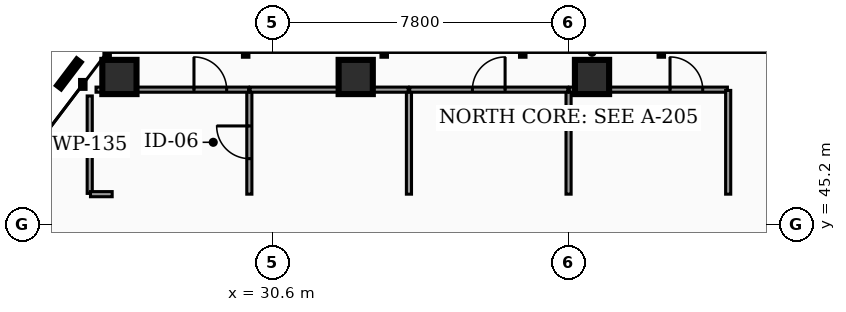
"""IFC4 building model, lengths in metres.
Left out: names, types, materials, properties, quantities, classifications, styles, units other than length and angle.
Written with IfcOpenShell. Run it as: python <this file> out.ifc"""

import sys

from ifc_helpers import new_model, si_unit, direction, frame, frame_2d, origin, origin_2d, place, context, subcontext, project, spatial, rectangle, hollow_rectangle, extrude, element, fill, save


model = new_model("IFC4")
c1 = context("Model", 3, precision=1e-05, world=origin(), true_north=direction((0.0, 1.0)))
c2 = subcontext(c1, "Body", "Model", "MODEL_VIEW")
j1 = project(units=[si_unit("LENGTHUNIT", "METRE"), si_unit("PLANEANGLEUNIT", "RADIAN")], contexts=[c1])
p1 = place(None, origin())
s1 = spatial("IfcSite", under=j1, at=p1, CompositionType="ELEMENT")
p2 = place(p1, origin())
s2 = spatial("IfcBuilding", under=s1, at=p2, CompositionType="ELEMENT")
p3 = place(p2, frame((0.0, 0.0, 80.58)))
s3 = spatial("IfcBuildingStorey", under=s2, at=p3, CompositionType="ELEMENT", Elevation=80.58)
p4 = place(p3, frame((39.017, 49.083, 0.0), z_axis=(-0.004982922693, -0.030472488775, 0.999523185279), x_axis=(0.986892561917, -0.161378657924, 0.0)))
e1 = element("IfcColumn", 1, at=p4, inside=s3, PredefinedType="COLUMN", context=c2, shape_type="SweptSolid", body=[
    extrude(hollow_rectangle(XDim=0.9, YDim=0.9, WallThickness=0.045, at=origin_2d()), origin(), (0.0, 0.0, 1.0), 3.822),
])
p5 = place(p3, frame((32.799, 49.083, 0.0), z_axis=(-0.074790251683, -0.03038752134, 0.996736182146), x_axis=(0.376419380936, -0.926449377816, 0.0)))
e2 = element("IfcColumn", 2, at=p5, inside=s3, PredefinedType="COLUMN", context=c2, shape_type="SweptSolid", body=[
    extrude(hollow_rectangle(XDim=0.9, YDim=0.9, WallThickness=0.045, at=origin_2d()), origin(), (0.0, 0.0, 1.0), 3.832),
])
p6 = place(p3, frame((26.581, 49.083, 0.0), z_axis=(-0.143392551065, -0.030157957168, 0.989206284816), x_axis=(0.205814766977, -0.978590967511, 0.0)))
e3 = element("IfcColumn", 3, at=p6, inside=s3, PredefinedType="COLUMN", context=c2, shape_type="SweptSolid", body=[
    extrude(hollow_rectangle(XDim=0.9, YDim=0.9, WallThickness=0.045, at=origin_2d()), origin(), (0.0, 0.0, 1.0), 3.862),
])
p7 = place(p3, frame((30.0, 46.0, 0.0), z_axis=(0.0, 0.0, 1.0), x_axis=(0.0, 1.0, 0.0)))
e4 = element("IfcWall", 4, at=p7, inside=s3, PredefinedType="PARTITIONING", context=c2, shape_type="SweptSolid", body=[
    extrude(rectangle(XDim=2.73, YDim=0.135, at=frame_2d((1.365, 0.0))), origin(), (0.0, 0.0, 1.0), 2.777),
])
p8 = place(p7, frame((0.935, 0.0, 0.0)))
e5 = element("IfcOpeningElement", 5, at=p8, cuts=e4, PredefinedType="OPENING", context=c2, shape_type="SweptSolid", body=[
    extrude(rectangle(XDim=0.86, YDim=2.05, at=frame_2d((0.43, 1.025))), frame((0.0, 0.077, 0.0), z_axis=(0.0, -1.0, 0.0), x_axis=(1.0, 0.0, 0.0)), (0.0, 0.0, 1.0), 0.155),
])
p9 = place(p3, frame((25.8, 46.02, 0.0), z_axis=(0.0, 0.0, 1.0), x_axis=(0.0, 1.0, 0.0)))
e6 = element("IfcWall", 6, at=p9, inside=s3, PredefinedType="PARTITIONING", context=c2, shape_type="SweptSolid", body=[
    extrude(rectangle(XDim=2.564, YDim=0.135, at=frame_2d((1.282, 0.0))), origin(), (0.0, 0.0, 1.0), 2.777),
])
p10 = place(p3, frame((25.966, 48.75, 0.0), z_axis=(0.0, 0.0, 1.0), x_axis=(1.0, 0.0, 0.0)))
e7 = element("IfcWall", 7, at=p10, inside=s3, PredefinedType="PARTITIONING", context=c2, shape_type="SweptSolid", body=[
    extrude(rectangle(XDim=4.014, YDim=0.135, at=frame_2d((2.007, 0.0))), origin(), (0.0, 0.0, 1.0), 2.777),
])
p11 = place(p10, frame((2.577, 0.0, 0.0)))
e8 = element("IfcOpeningElement", 8, at=p11, cuts=e7, PredefinedType="OPENING", context=c2, shape_type="SweptSolid", body=[
    extrude(rectangle(XDim=0.86, YDim=2.05, at=frame_2d((0.43, 1.025))), frame((0.0, 0.077, 0.0), z_axis=(0.0, -1.0, 0.0), x_axis=(1.0, 0.0, 0.0)), (0.0, 0.0, 1.0), 0.155),
])
p12 = place(p3, frame((25.82, 46.0, 0.0), z_axis=(0.0, 0.0, 1.0), x_axis=(1.0, 0.0, 0.0)))
e9 = element("IfcWall", 9, at=p12, inside=s3, PredefinedType="PARTITIONING", context=c2, shape_type="SweptSolid", body=[
    extrude(rectangle(XDim=0.571, YDim=0.135, at=frame_2d((0.285, 0.0))), origin(), (0.0, 0.0, 1.0), 2.777),
])
p13 = place(p3, frame((34.2, 46.0, 0.0), z_axis=(0.0, 0.0, 1.0), x_axis=(0.0, 1.0, 0.0)))
e10 = element("IfcWall", 10, at=p13, inside=s3, PredefinedType="PARTITIONING", context=c2, shape_type="SweptSolid", body=[
    extrude(rectangle(XDim=2.73, YDim=0.135, at=frame_2d((1.365, 0.0))), origin(), (0.0, 0.0, 1.0), 2.777),
])
p14 = place(p3, frame((30.02, 48.75, 0.0), z_axis=(0.0, 0.0, 1.0), x_axis=(1.0, 0.0, 0.0)))
e11 = element("IfcWall", 11, at=p14, inside=s3, PredefinedType="PARTITIONING", context=c2, shape_type="SweptSolid", body=[
    extrude(rectangle(XDim=4.16, YDim=0.135, at=frame_2d((2.08, 0.0))), origin(), (0.0, 0.0, 1.0), 2.777),
])
p15 = place(p3, frame((38.4, 46.0, 0.0), z_axis=(0.0, 0.0, 1.0), x_axis=(0.0, 1.0, 0.0)))
e12 = element("IfcWall", 12, at=p15, inside=s3, PredefinedType="PARTITIONING", context=c2, shape_type="SweptSolid", body=[
    extrude(rectangle(XDim=2.73, YDim=0.135, at=frame_2d((1.365, 0.0))), origin(), (0.0, 0.0, 1.0), 2.777),
])
p16 = place(p3, frame((34.22, 48.75, 0.0), z_axis=(0.0, 0.0, 1.0), x_axis=(1.0, 0.0, 0.0)))
e13 = element("IfcWall", 13, at=p16, inside=s3, PredefinedType="PARTITIONING", context=c2, shape_type="SweptSolid", body=[
    extrude(rectangle(XDim=4.16, YDim=0.135, at=frame_2d((2.08, 0.0))), origin(), (0.0, 0.0, 1.0), 2.777),
])
p17 = place(p16, frame((1.65, 0.0, 0.0)))
e14 = element("IfcOpeningElement", 14, at=p17, cuts=e13, PredefinedType="OPENING", context=c2, shape_type="SweptSolid", body=[
    extrude(rectangle(XDim=0.86, YDim=2.05, at=frame_2d((0.43, 1.025))), frame((0.0, 0.077, 0.0), z_axis=(0.0, -1.0, 0.0), x_axis=(1.0, 0.0, 0.0)), (0.0, 0.0, 1.0), 0.155),
])
p18 = place(p3, frame((38.42, 48.75, 0.0), z_axis=(0.0, 0.0, 1.0), x_axis=(1.0, 0.0, 0.0)))
e15 = element("IfcWall", 15, at=p18, inside=s3, PredefinedType="PARTITIONING", context=c2, shape_type="SweptSolid", body=[
    extrude(rectangle(XDim=4.16, YDim=0.135, at=frame_2d((2.08, 0.0))), origin(), (0.0, 0.0, 1.0), 2.777),
])
p19 = place(p18, frame((2.65, 0.0, 0.0)))
e16 = element("IfcOpeningElement", 16, at=p19, cuts=e15, PredefinedType="OPENING", context=c2, shape_type="SweptSolid", body=[
    extrude(rectangle(XDim=0.86, YDim=2.05, at=frame_2d((0.43, 1.025))), frame((0.0, 0.077, 0.0), z_axis=(0.0, -1.0, 0.0), x_axis=(1.0, 0.0, 0.0)), (0.0, 0.0, 1.0), 0.155),
])
p20 = place(p3, frame((42.6, 46.0, 0.0), z_axis=(0.0, 0.0, 1.0), x_axis=(0.0, 1.0, 0.0)))
e17 = element("IfcWall", 17, at=p20, inside=s3, PredefinedType="PARTITIONING", context=c2, shape_type="SweptSolid", body=[
    extrude(rectangle(XDim=2.73, YDim=0.135, at=frame_2d((1.365, 0.0))), origin(), (0.0, 0.0, 1.0), 2.777),
])
p21 = place(p8, origin())
e18 = element("IfcDoor", 18, at=p21, inside=s3, OperationType="SINGLE_SWING_RIGHT", PredefinedType="DOOR", context=c2, shape_type="SweptSolid", body=[
    extrude(rectangle(XDim=0.86, YDim=2.05, at=frame_2d((0.43, 1.025))), frame((0.0, 0.025, 0.0), z_axis=(0.0, -1.0, 0.0), x_axis=(1.0, 0.0, 0.0)), (0.0, 0.0, 1.0), 0.05),
])
fill(e5, e18)
p22 = place(p11, origin())
e19 = element("IfcDoor", 19, at=p22, inside=s3, OperationType="SINGLE_SWING_LEFT", PredefinedType="DOOR", context=c2, shape_type="SweptSolid", body=[
    extrude(rectangle(XDim=0.86, YDim=2.05, at=frame_2d((0.43, 1.025))), frame((0.0, 0.025, 0.0), z_axis=(0.0, -1.0, 0.0), x_axis=(1.0, 0.0, 0.0)), (0.0, 0.0, 1.0), 0.05),
])
fill(e8, e19)
p23 = place(p17, origin())
e20 = element("IfcDoor", 20, at=p23, inside=s3, OperationType="SINGLE_SWING_RIGHT", PredefinedType="DOOR", context=c2, shape_type="SweptSolid", body=[
    extrude(rectangle(XDim=0.86, YDim=2.05, at=frame_2d((0.43, 1.025))), frame((0.0, 0.025, 0.0), z_axis=(0.0, -1.0, 0.0), x_axis=(1.0, 0.0, 0.0)), (0.0, 0.0, 1.0), 0.05),
])
fill(e14, e20)
p24 = place(p19, origin())
e21 = element("IfcDoor", 21, at=p24, inside=s3, OperationType="SINGLE_SWING_LEFT", PredefinedType="DOOR", context=c2, shape_type="SweptSolid", body=[
    extrude(rectangle(XDim=0.86, YDim=2.05, at=frame_2d((0.43, 1.025))), frame((0.0, 0.025, 0.0), z_axis=(0.0, -1.0, 0.0), x_axis=(1.0, 0.0, 0.0)), (0.0, 0.0, 1.0), 0.05),
])
fill(e16, e21)
save(model, sys.argv[1])
